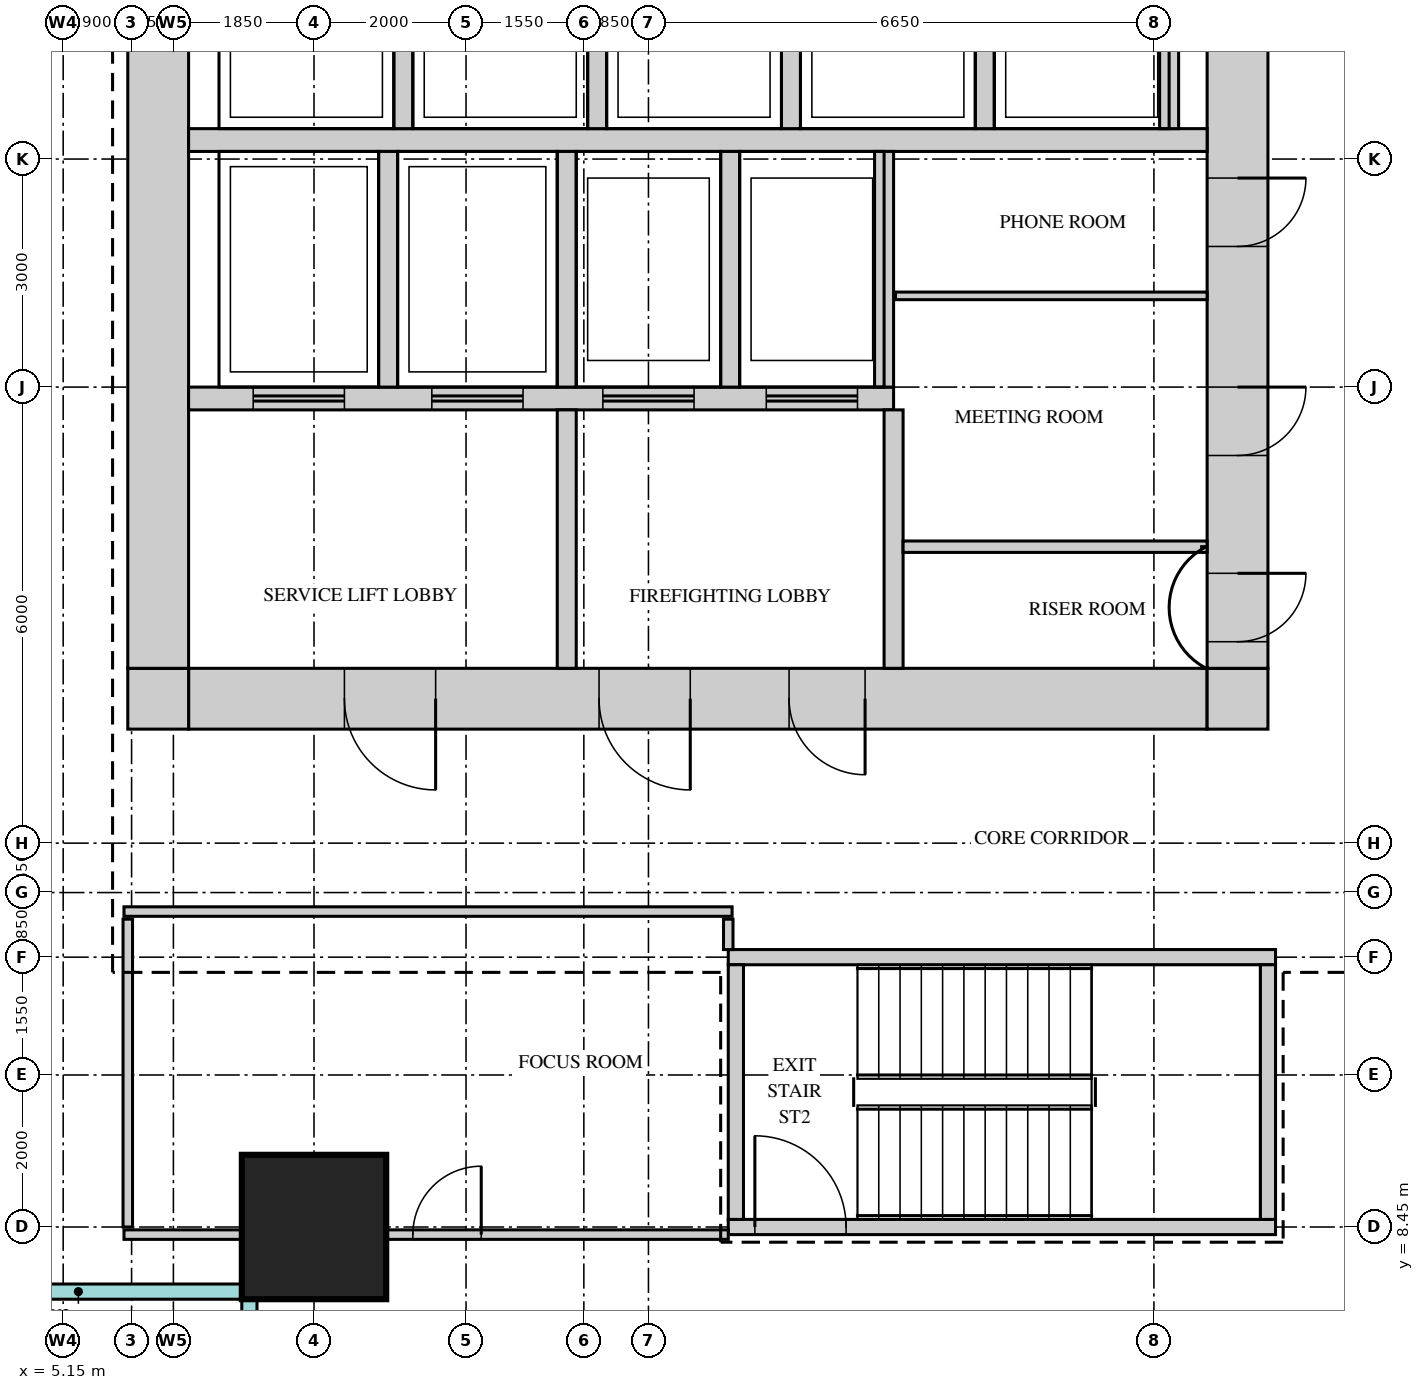
"""IFC4 building model, lengths in metres.
Left out: names, types, materials, properties, quantities, classifications, styles, units other than length and angle.
Written with IfcOpenShell. Run it as: python <this file> out.ifc"""

import sys

from ifc_helpers import new_model, si_unit, direction, frame, frame_2d, origin, origin_2d, place, context, subcontext, project, spatial, rectangle, extrude, source, transform, mapped, element, fill, save


model = new_model("IFC4")
c1 = context("Model", 3, precision=1e-05, world=origin(), true_north=direction((0.0, 1.0)))
c2 = subcontext(c1, "Body", "Model", "MODEL_VIEW")
j1 = project(units=[si_unit("LENGTHUNIT", "METRE"), si_unit("PLANEANGLEUNIT", "RADIAN")], contexts=[c1])
p1 = place(None, origin())
s1 = spatial("IfcSite", under=j1, at=p1, CompositionType="ELEMENT")
p2 = place(p1, origin())
s2 = spatial("IfcBuilding", under=s1, at=p2, CompositionType="ELEMENT")
p3 = place(p2, frame((0.0, 0.0, 168.7)))
s3 = spatial("IfcBuildingStorey", under=s2, at=p3, CompositionType="ELEMENT", Elevation=168.7)
m1 = source(origin(), c2, "Body", "SweptSolid", [
    extrude(rectangle(XDim=13.4, YDim=0.8, at=frame_2d((6.7, 0.0))), origin(), (0.0, 0.0, 1.0), 3.75),
])
p4 = place(p3, frame((6.8, 15.4, 0.0), z_axis=(0.0, 0.0, 1.0), x_axis=(1.0, 0.0, 0.0)))
e1 = element("IfcWall", 1, at=p4, inside=s3, PredefinedType="SHEAR", context=c2, shape_type="MappedRepresentation", body=[
    mapped(m1, transform((0.0, 0.0, 0.0))),
])
m2 = source(origin(), c2, "Body", "SweptSolid", [
    extrude(rectangle(XDim=1.2, YDim=2.1, at=frame_2d((0.6, 1.05))), frame((0.0, 0.41, 0.0), z_axis=(0.0, -1.0, 0.0), x_axis=(1.0, 0.0, 0.0)), (0.0, 0.0, 1.0), 0.82),
])
p5 = place(p4, frame((5.4, 0.0, 0.0)))
e2 = element("IfcOpeningElement", 2, at=p5, cuts=e1, PredefinedType="OPENING", context=c2, shape_type="MappedRepresentation", body=[
    mapped(m2, transform((0.0, 0.0, 0.0))),
])
p6 = place(p4, frame((2.05, 0.0, 0.0)))
e3 = element("IfcOpeningElement", 3, at=p6, cuts=e1, PredefinedType="OPENING", context=c2, shape_type="MappedRepresentation", body=[
    mapped(m2, transform((0.0, 0.0, 0.0))),
])
m3 = source(origin(), c2, "Body", "SweptSolid", [
    extrude(rectangle(XDim=1.0, YDim=2.1, at=frame_2d((0.5, 1.05))), frame((0.0, 0.41, 0.0), z_axis=(0.0, -1.0, 0.0), x_axis=(1.0, 0.0, 0.0)), (0.0, 0.0, 1.0), 0.82),
])
p7 = place(p4, frame((7.9, 0.0, 0.0)))
e4 = element("IfcOpeningElement", 4, at=p7, cuts=e1, PredefinedType="OPENING", context=c2, shape_type="MappedRepresentation", body=[
    mapped(m3, transform((0.0, 0.0, 0.0))),
])
m4 = source(origin(), c2, "Body", "SweptSolid", [
    extrude(rectangle(XDim=0.8, YDim=0.8, at=frame_2d((0.4, 0.0))), origin(), (0.0, 0.0, 1.0), 3.75),
])
for number, where, z_axis, x_axis in (
    (5, (20.2, 15.4, 0.0), (0.0, 0.0, 1.0), (1.0, 0.0, 0.0)),
    (6, (6.0, 15.4, 0.0), (0.0, 0.0, 1.0), (1.0, 0.0, 0.0)),
):
    element("IfcWall", number, at=place(p3, frame(where, z_axis=z_axis, x_axis=x_axis)), inside=s3, PredefinedType="SHEAR", context=c2, shape_type="MappedRepresentation", body=[
        mapped(m4, transform((0.0, 0.0, 0.0))),
    ])
m5 = source(origin(), c2, "Body", "SweptSolid", [
    extrude(rectangle(XDim=22.4, YDim=0.8, at=frame_2d((11.2, 0.0))), origin(), (0.0, 0.0, 1.0), 3.75),
])
p8 = place(p3, frame((20.6, 15.8, 0.0), z_axis=(0.0, 0.0, 1.0), x_axis=(0.0, 1.0, 0.0)))
e7 = element("IfcWall", 7, at=p8, inside=s3, PredefinedType="SHEAR", context=c2, shape_type="MappedRepresentation", body=[
    mapped(m5, transform((0.0, 0.0, 0.0))),
])
m6 = source(origin(), c2, "Body", "SweptSolid", [
    extrude(rectangle(XDim=1.8, YDim=2.1, at=frame_2d((0.9, 1.05))), frame((0.0, 0.41, 0.0), z_axis=(0.0, -1.0, 0.0), x_axis=(1.0, 0.0, 0.0)), (0.0, 0.0, 1.0), 0.82),
])
p9 = place(p8, frame((10.7, 0.0, 0.0)))
e8 = element("IfcOpeningElement", 8, at=p9, cuts=e7, PredefinedType="OPENING", context=c2, shape_type="MappedRepresentation", body=[
    mapped(m6, transform((0.0, 0.0, 0.0))),
])
m7 = source(origin(), c2, "Body", "SweptSolid", [
    extrude(rectangle(XDim=0.9, YDim=2.1, at=frame_2d((0.45, 1.05))), frame((0.0, 0.41, 0.0), z_axis=(0.0, -1.0, 0.0), x_axis=(1.0, 0.0, 0.0)), (0.0, 0.0, 1.0), 0.82),
])
p10 = place(p8, frame((0.35, 0.0, 0.0)))
e9 = element("IfcOpeningElement", 9, at=p10, cuts=e7, PredefinedType="OPENING", context=c2, shape_type="MappedRepresentation", body=[
    mapped(m7, transform((0.0, 0.0, 0.0))),
])
p11 = place(p8, frame((2.8, 0.0, 0.0)))
e10 = element("IfcOpeningElement", 10, at=p11, cuts=e7, PredefinedType="OPENING", context=c2, shape_type="MappedRepresentation", body=[
    mapped(m7, transform((0.0, 0.0, 0.0))),
])
p12 = place(p8, frame((5.55, 0.0, 0.0)))
e11 = element("IfcOpeningElement", 11, at=p12, cuts=e7, PredefinedType="OPENING", context=c2, shape_type="MappedRepresentation", body=[
    mapped(m7, transform((0.0, 0.0, 0.0))),
])
p13 = place(p3, frame((6.4, 15.8, 0.0), z_axis=(0.0, 0.0, 1.0), x_axis=(0.0, 1.0, 0.0)))
e12 = element("IfcWall", 12, at=p13, inside=s3, PredefinedType="SHEAR", context=c2, shape_type="MappedRepresentation", body=[
    mapped(m5, transform((0.0, 0.0, 0.0))),
])
m8 = source(origin(), c2, "Body", "SweptSolid", [
    extrude(rectangle(XDim=7.2, YDim=0.2, at=frame_2d((3.6, 0.0))), origin(), (0.0, 0.0, 1.0), 3.75),
])
p14 = place(p3, frame((13.9, 12.0, 0.0), z_axis=(0.0, 0.0, 1.0), x_axis=(1.0, 0.0, 0.0)))
e13 = element("IfcWall", 13, at=p14, inside=s3, PredefinedType="SHEAR", context=c2, shape_type="MappedRepresentation", body=[
    mapped(m8, transform((0.0, 0.0, 0.0))),
])
p15 = place(p3, frame((13.9, 8.45, 0.0), z_axis=(0.0, 0.0, 1.0), x_axis=(1.0, 0.0, 0.0)))
e14 = element("IfcWall", 14, at=p15, inside=s3, PredefinedType="SHEAR", context=c2, shape_type="MappedRepresentation", body=[
    mapped(m8, transform((0.0, 0.0, 0.0))),
])
m9 = source(origin(), c2, "Body", "SweptSolid", [
    extrude(rectangle(XDim=1.2, YDim=2.1, at=frame_2d((0.6, 1.05))), frame((0.0, 0.11, 0.0), z_axis=(0.0, -1.0, 0.0), x_axis=(1.0, 0.0, 0.0)), (0.0, 0.0, 1.0), 0.22),
])
p16 = place(p15, frame((0.35, 0.0, 0.0)))
e15 = element("IfcOpeningElement", 15, at=p16, cuts=e14, PredefinedType="OPENING", context=c2, shape_type="MappedRepresentation", body=[
    mapped(m9, transform((0.0, 0.0, 0.0))),
])
m10 = source(origin(), c2, "Body", "SweptSolid", [
    extrude(rectangle(XDim=3.35, YDim=0.2, at=frame_2d((1.675, 0.0))), origin(), (0.0, 0.0, 1.0), 3.75),
])
for number, where, z_axis, x_axis in (
    (16, (21.0, 8.55, 0.0), (0.0, 0.0, 1.0), (0.0, 1.0, 0.0)),
    (17, (14.0, 8.55, 0.0), (0.0, 0.0, 1.0), (0.0, 1.0, 0.0)),
):
    element("IfcWall", number, at=place(p3, frame(where, z_axis=z_axis, x_axis=x_axis)), inside=s3, PredefinedType="SHEAR", context=c2, shape_type="MappedRepresentation", body=[
        mapped(m10, transform((0.0, 0.0, 0.0))),
    ])
m11 = source(origin(), c2, "Body", "SweptSolid", [
    extrude(rectangle(XDim=13.4, YDim=0.3, at=frame_2d((6.7, 0.0))), origin(), (0.0, 0.0, 1.0), 3.75),
])
p17 = place(p3, frame((6.8, 22.75, 0.0), z_axis=(0.0, 0.0, 1.0), x_axis=(1.0, 0.0, 0.0)))
e18 = element("IfcWall", 18, at=p17, inside=s3, PredefinedType="STANDARD", context=c2, shape_type="MappedRepresentation", body=[
    mapped(m11, transform((0.0, 0.0, 0.0))),
])
m12 = source(origin(), c2, "Body", "SweptSolid", [
    extrude(rectangle(XDim=9.275, YDim=0.3, at=frame_2d((4.637, 0.0))), origin(), (0.0, 0.0, 1.0), 3.75),
])
p18 = place(p3, frame((6.8, 19.35, 0.0), z_axis=(0.0, 0.0, 1.0), x_axis=(1.0, 0.0, 0.0)))
e19 = element("IfcWall", 19, at=p18, inside=s3, PredefinedType="STANDARD", context=c2, shape_type="MappedRepresentation", body=[
    mapped(m12, transform((0.0, 0.0, 0.0))),
])
m13 = source(origin(), c2, "Body", "SweptSolid", [
    extrude(rectangle(XDim=1.2, YDim=2.1, at=frame_2d((0.6, 1.05))), frame((0.0, 0.16, 0.0), z_axis=(0.0, -1.0, 0.0), x_axis=(1.0, 0.0, 0.0)), (0.0, 0.0, 1.0), 0.32),
])
p19 = place(p18, frame((0.85, 0.0, 0.0)))
e20 = element("IfcOpeningElement", 20, at=p19, cuts=e19, PredefinedType="OPENING", context=c2, shape_type="MappedRepresentation", body=[
    mapped(m13, transform((0.0, 0.0, 0.0))),
])
p20 = place(p18, frame((3.2, 0.0, 0.0)))
e21 = element("IfcOpeningElement", 21, at=p20, cuts=e19, PredefinedType="OPENING", context=c2, shape_type="MappedRepresentation", body=[
    mapped(m13, transform((0.0, 0.0, 0.0))),
])
p21 = place(p18, frame((5.45, 0.0, 0.0)))
e22 = element("IfcOpeningElement", 22, at=p21, cuts=e19, PredefinedType="OPENING", context=c2, shape_type="MappedRepresentation", body=[
    mapped(m13, transform((0.0, 0.0, 0.0))),
])
p22 = place(p18, frame((7.6, 0.0, 0.0)))
e23 = element("IfcOpeningElement", 23, at=p22, cuts=e19, PredefinedType="OPENING", context=c2, shape_type="MappedRepresentation", body=[
    mapped(m13, transform((0.0, 0.0, 0.0))),
])
m14 = source(origin(), c2, "Body", "SweptSolid", [
    extrude(rectangle(XDim=3.1, YDim=0.25, at=frame_2d((1.55, 0.0))), origin(), (0.0, 0.0, 1.0), 3.75),
])
for number, where, z_axis, x_axis in (
    (24, (9.425, 19.5, 0.0), (0.0, 0.0, 1.0), (0.0, 1.0, 0.0)),
    (25, (11.775, 19.5, 0.0), (0.0, 0.0, 1.0), (0.0, 1.0, 0.0)),
    (26, (13.925, 19.5, 0.0), (0.0, 0.0, 1.0), (0.0, 1.0, 0.0)),
    (27, (15.95, 19.5, 0.0), (0.0, 0.0, 1.0), (0.0, 1.0, 0.0)),
):
    element("IfcWall", number, at=place(p3, frame(where, z_axis=z_axis, x_axis=x_axis)), inside=s3, PredefinedType="STANDARD", context=c2, shape_type="MappedRepresentation", body=[
        mapped(m14, transform((0.0, 0.0, 0.0))),
    ])
m15 = source(origin(), c2, "Body", "SweptSolid", [
    extrude(rectangle(XDim=2.4, YDim=0.25, at=frame_2d((1.2, 0.0))), origin(), (0.0, 0.0, 1.0), 3.75),
])
for number, where, z_axis, x_axis in (
    (28, (17.275, 22.9, 0.0), (0.0, 0.0, 1.0), (0.0, 1.0, 0.0)),
    (29, (19.7, 22.9, 0.0), (0.0, 0.0, 1.0), (0.0, 1.0, 0.0)),
    (30, (9.625, 22.9, 0.0), (0.0, 0.0, 1.0), (0.0, 1.0, 0.0)),
    (31, (12.175, 22.9, 0.0), (0.0, 0.0, 1.0), (0.0, 1.0, 0.0)),
    (32, (14.725, 22.9, 0.0), (0.0, 0.0, 1.0), (0.0, 1.0, 0.0)),
):
    element("IfcWall", number, at=place(p3, frame(where, z_axis=z_axis, x_axis=x_axis)), inside=s3, PredefinedType="STANDARD", context=c2, shape_type="MappedRepresentation", body=[
        mapped(m15, transform((0.0, 0.0, 0.0))),
    ])
m16 = source(origin(), c2, "Body", "SweptSolid", [
    extrude(rectangle(XDim=3.4, YDim=0.25, at=frame_2d((1.7, 0.0))), origin(), (0.0, 0.0, 1.0), 3.75),
])
for number, where, z_axis, x_axis in (
    (33, (16.075, 15.8, 0.0), (0.0, 0.0, 1.0), (0.0, 1.0, 0.0)),
    (34, (11.775, 15.8, 0.0), (0.0, 0.0, 1.0), (0.0, 1.0, 0.0)),
):
    element("IfcWall", number, at=place(p3, frame(where, z_axis=z_axis, x_axis=x_axis)), inside=s3, PredefinedType="STANDARD", context=c2, shape_type="MappedRepresentation", body=[
        mapped(m16, transform((0.0, 0.0, 0.0))),
    ])
m17 = source(origin(), c2, "Body", "SweptSolid", [
    extrude(rectangle(XDim=1.9, YDim=1.9, at=origin_2d()), origin(), (0.0, 0.0, 1.0), 4.0),
])
p23 = place(p3, frame((8.45, 8.45, 0.0), z_axis=(0.0, 0.0, 1.0), x_axis=(1.0, 0.0, 0.0)))
e35 = element("IfcColumn", 35, at=p23, inside=s3, PredefinedType="COLUMN", context=c2, shape_type="MappedRepresentation", body=[
    mapped(m17, transform((0.0, 0.0, 0.0))),
])
m18 = source(origin(), c2, "Body", "SweptSolid", [
    extrude(rectangle(XDim=7.95, YDim=0.125, at=frame_2d((3.975, 0.0))), origin(), (0.0, 0.0, 1.0), 3.25),
])
p24 = place(p3, frame((5.95, 8.35, 0.0), z_axis=(0.0, 0.0, 1.0), x_axis=(1.0, 0.0, 0.0)))
e36 = element("IfcWall", 36, at=p24, inside=s3, PredefinedType="PARTITIONING", context=c2, shape_type="MappedRepresentation", body=[
    mapped(m18, transform((0.0, 0.0, 0.0))),
])
m19 = source(origin(), c2, "Body", "SweptSolid", [
    extrude(rectangle(XDim=0.9, YDim=2.1, at=frame_2d((0.45, 1.05))), frame((0.0, 0.073, 0.0), z_axis=(0.0, -1.0, 0.0), x_axis=(1.0, 0.0, 0.0)), (0.0, 0.0, 1.0), 0.145),
])
p25 = place(p24, frame((3.8, 0.0, 0.0)))
e37 = element("IfcOpeningElement", 37, at=p25, cuts=e36, PredefinedType="OPENING", context=c2, shape_type="MappedRepresentation", body=[
    mapped(m19, transform((0.0, 0.0, 0.0))),
])
m20 = source(origin(), c2, "Body", "SweptSolid", [
    extrude(rectangle(XDim=4.05, YDim=0.125, at=frame_2d((2.025, 0.0))), origin(), (0.0, 0.0, 1.0), 3.8),
])
p26 = place(p3, frame((6.0, 8.45, 0.0), z_axis=(0.0, 0.0, 1.0), x_axis=(0.0, 1.0, 0.0)))
e38 = element("IfcWall", 38, at=p26, inside=s3, PredefinedType="PARTITIONING", context=c2, shape_type="MappedRepresentation", body=[
    mapped(m20, transform((0.0, 0.0, 0.0))),
])
m21 = source(origin(), c2, "Body", "SweptSolid", [
    extrude(rectangle(XDim=0.4, YDim=0.125, at=frame_2d((0.2, 0.0))), origin(), (0.0, 0.0, 1.0), 3.8),
])
p27 = place(p3, frame((13.9, 12.1, 0.0), z_axis=(0.0, 0.0, 1.0), x_axis=(0.0, 1.0, 0.0)))
e39 = element("IfcWall", 39, at=p27, inside=s3, PredefinedType="PARTITIONING", context=c2, shape_type="MappedRepresentation", body=[
    mapped(m21, transform((0.0, 0.0, 0.0))),
])
m22 = source(origin(), c2, "Body", "SweptSolid", [
    extrude(rectangle(XDim=8.0, YDim=0.125, at=frame_2d((4.0, 0.0))), origin(), (0.0, 0.0, 1.0), 3.8),
])
p28 = place(p3, frame((5.95, 12.6, 0.0), z_axis=(0.0, 0.0, 1.0), x_axis=(1.0, 0.0, 0.0)))
e40 = element("IfcWall", 40, at=p28, inside=s3, PredefinedType="PARTITIONING", context=c2, shape_type="MappedRepresentation", body=[
    mapped(m22, transform((0.0, 0.0, 0.0))),
])
m23 = source(origin(), c2, "Body", "SweptSolid", [
    extrude(rectangle(XDim=4.0, YDim=0.15, at=frame_2d((2.0, 0.0))), origin(), (0.0, 0.0, 1.0), 3.8),
])
p29 = place(p3, frame((16.2, 17.4, 0.0), z_axis=(0.0, 0.0, 1.0), x_axis=(1.0, 0.0, 0.0)))
e41 = element("IfcWall", 41, at=p29, inside=s3, PredefinedType="PARTITIONING", context=c2, shape_type="MappedRepresentation", body=[
    mapped(m23, transform((0.0, 0.0, 0.0))),
])
m24 = source(origin(), c2, "Body", "SweptSolid", [
    extrude(rectangle(XDim=4.1, YDim=0.1, at=frame_2d((2.05, 0.0))), origin(), (0.0, 0.0, 1.0), 3.8),
])
p30 = place(p3, frame((16.1, 20.7, 0.0), z_axis=(0.0, 0.0, 1.0), x_axis=(1.0, 0.0, 0.0)))
e42 = element("IfcWall", 42, at=p30, inside=s3, PredefinedType="PARTITIONING", context=c2, shape_type="MappedRepresentation", body=[
    mapped(m24, transform((0.0, 0.0, 0.0))),
])
m25 = source(origin(), c2, "Body", "SweptSolid", [
    extrude(rectangle(XDim=0.9, YDim=2.1, at=frame_2d((0.45, 1.05))), frame((0.0, 0.35, 0.0), z_axis=(0.0, -1.0, 0.0), x_axis=(1.0, 0.0, 0.0)), (0.0, 0.0, 1.0), 0.7),
])
p31 = place(p10, origin())
e43 = element("IfcDoor", 43, at=p31, inside=s3, OperationType="SINGLE_SWING_RIGHT", PredefinedType="DOOR", context=c2, shape_type="MappedRepresentation", body=[
    mapped(m25, transform((0.0, 0.0, 0.0))),
])
fill(e9, e43)
p32 = place(p11, origin())
e44 = element("IfcDoor", 44, at=p32, inside=s3, OperationType="SINGLE_SWING_RIGHT", PredefinedType="DOOR", context=c2, shape_type="MappedRepresentation", body=[
    mapped(m25, transform((0.0, 0.0, 0.0))),
])
fill(e10, e44)
p33 = place(p12, origin())
e45 = element("IfcDoor", 45, at=p33, inside=s3, OperationType="SINGLE_SWING_RIGHT", PredefinedType="DOOR", context=c2, shape_type="MappedRepresentation", body=[
    mapped(m25, transform((0.0, 0.0, 0.0))),
])
fill(e11, e45)
m26 = source(origin(), c2, "Body", "SweptSolid", [
    extrude(rectangle(XDim=1.2, YDim=2.1, at=frame_2d((0.6, 1.05))), frame((0.0, 0.35, 0.0), z_axis=(0.0, -1.0, 0.0), x_axis=(1.0, 0.0, 0.0)), (0.0, 0.0, 1.0), 0.7),
])
p34 = place(p5, origin())
e46 = element("IfcDoor", 46, at=p34, inside=s3, OperationType="SINGLE_SWING_RIGHT", PredefinedType="DOOR", context=c2, shape_type="MappedRepresentation", body=[
    mapped(m26, transform((0.0, 0.0, 0.0))),
])
fill(e2, e46)
p35 = place(p6, origin())
e47 = element("IfcDoor", 47, at=p35, inside=s3, OperationType="SINGLE_SWING_RIGHT", PredefinedType="DOOR", context=c2, shape_type="MappedRepresentation", body=[
    mapped(m26, transform((0.0, 0.0, 0.0))),
])
fill(e3, e47)
m27 = source(origin(), c2, "Body", "SweptSolid", [
    extrude(rectangle(XDim=1.0, YDim=2.1, at=frame_2d((0.5, 1.05))), frame((0.0, 0.35, 0.0), z_axis=(0.0, -1.0, 0.0), x_axis=(1.0, 0.0, 0.0)), (0.0, 0.0, 1.0), 0.7),
])
p36 = place(p7, origin())
e48 = element("IfcDoor", 48, at=p36, inside=s3, OperationType="SINGLE_SWING_RIGHT", PredefinedType="DOOR", context=c2, shape_type="MappedRepresentation", body=[
    mapped(m27, transform((0.0, 0.0, 0.0))),
])
fill(e4, e48)
m28 = source(origin(), c2, "Body", "SweptSolid", [
    extrude(rectangle(XDim=0.9, YDim=2.1, at=frame_2d((0.45, 1.05))), frame((0.0, 0.025, 0.0), z_axis=(0.0, -1.0, 0.0), x_axis=(1.0, 0.0, 0.0)), (0.0, 0.0, 1.0), 0.05),
])
p37 = place(p25, origin())
e49 = element("IfcDoor", 49, at=p37, inside=s3, OperationType="SINGLE_SWING_LEFT", PredefinedType="DOOR", context=c2, shape_type="MappedRepresentation", body=[
    mapped(m28, transform((0.0, 0.0, 0.0))),
])
fill(e37, e49)
m29 = source(origin(), c2, "Body", "SweptSolid", [
    extrude(rectangle(XDim=1.2, YDim=2.1, at=frame_2d((0.6, 1.05))), frame((0.0, 0.025, 0.0), z_axis=(0.0, -1.0, 0.0), x_axis=(1.0, 0.0, 0.0)), (0.0, 0.0, 1.0), 0.05),
])
p38 = place(p16, origin())
e50 = element("IfcDoor", 50, at=p38, inside=s3, OperationType="SINGLE_SWING_RIGHT", PredefinedType="DOOR", context=c2, shape_type="MappedRepresentation", body=[
    mapped(m29, transform((0.0, 0.0, 0.0))),
])
fill(e15, e50)
p39 = place(p19, origin())
e51 = element("IfcDoor", 51, at=p39, inside=s3, OperationType="DOUBLE_DOOR_SLIDING", PredefinedType="DOOR", context=c2, shape_type="MappedRepresentation", body=[
    mapped(m29, transform((0.0, 0.0, 0.0))),
])
fill(e20, e51)
p40 = place(p20, origin())
e52 = element("IfcDoor", 52, at=p40, inside=s3, OperationType="DOUBLE_DOOR_SLIDING", PredefinedType="DOOR", context=c2, shape_type="MappedRepresentation", body=[
    mapped(m29, transform((0.0, 0.0, 0.0))),
])
fill(e21, e52)
p41 = place(p21, origin())
e53 = element("IfcDoor", 53, at=p41, inside=s3, OperationType="DOUBLE_DOOR_SLIDING", PredefinedType="DOOR", context=c2, shape_type="MappedRepresentation", body=[
    mapped(m29, transform((0.0, 0.0, 0.0))),
])
fill(e22, e53)
p42 = place(p22, origin())
e54 = element("IfcDoor", 54, at=p42, inside=s3, OperationType="DOUBLE_DOOR_SLIDING", PredefinedType="DOOR", context=c2, shape_type="MappedRepresentation", body=[
    mapped(m29, transform((0.0, 0.0, 0.0))),
])
fill(e23, e54)
save(model, sys.argv[1])
